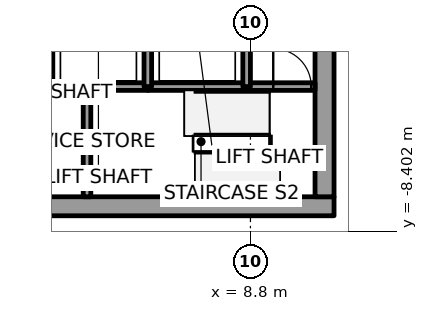
"""IFC4 building model, lengths in metres.
Left out: names, types, materials, properties, quantities, classifications, styles, units other than length and angle.
Written with IfcOpenShell. Run it as: python <this file> out.ifc"""

import sys

from ifc_helpers import new_model, si_unit, direction, frame, frame_2d, origin, place, context, subcontext, project, spatial, rectangle, extrude, element, fill, save


model = new_model("IFC4")
c1 = context("Model", 3, precision=1e-05, world=origin(), true_north=direction((0.0, 1.0)))
c2 = subcontext(c1, "Body", "Model", "MODEL_VIEW")
j1 = project(units=[si_unit("LENGTHUNIT", "METRE"), si_unit("PLANEANGLEUNIT", "RADIAN")], contexts=[c1])
p1 = place(None, origin())
s1 = spatial("IfcSite", under=j1, at=p1, CompositionType="ELEMENT")
p2 = place(p1, origin())
s2 = spatial("IfcBuilding", under=s1, at=p2, CompositionType="ELEMENT")
p3 = place(p2, frame((0.0, 0.0, 107.2)))
s3 = spatial("IfcBuildingStorey", under=s2, at=p3, CompositionType="ELEMENT", Elevation=107.2)
p4 = place(p3, frame((-11.0, -7.75, 0.0), z_axis=(0.0, 0.0, 1.0), x_axis=(1.0, 0.0, 0.0)))
e1 = element("IfcWall", 1, at=p4, inside=s3, PredefinedType="SHEAR", context=c2, shape_type="SweptSolid", body=[
    extrude(rectangle(XDim=22.0, YDim=0.5, at=frame_2d((11.0, 0.0))), origin(), (0.0, 0.0, 1.0), 5.4),
])
p5 = place(p4, frame((10.45, 0.0, 0.0)))
e2 = element("IfcOpeningElement", 2, at=p5, cuts=e1, PredefinedType="OPENING", context=c2, shape_type="SweptSolid", body=[
    extrude(rectangle(XDim=1.1, YDim=2.1, at=frame_2d((0.55, 1.05))), frame((0.0, 0.25, 0.0), z_axis=(0.0, -1.0, 0.0), x_axis=(1.0, 0.0, 0.0)), (0.0, 0.0, 1.0), 0.5),
])
p6 = place(p3, frame((10.75, -7.5, 0.0), z_axis=(0.0, 0.0, 1.0), x_axis=(0.0, 1.0, 0.0)))
e3 = element("IfcWall", 3, at=p6, inside=s3, PredefinedType="SHEAR", context=c2, shape_type="SweptSolid", body=[
    extrude(rectangle(XDim=15.0, YDim=0.5, at=frame_2d((7.5, 0.0))), origin(), (0.0, 0.0, 1.0), 5.4),
])
p7 = place(p6, frame((6.6, 0.0, 0.0)))
e4 = element("IfcOpeningElement", 4, at=p7, cuts=e3, PredefinedType="OPENING", context=c2, shape_type="SweptSolid", body=[
    extrude(rectangle(XDim=1.8, YDim=2.1, at=frame_2d((0.9, 1.05))), frame((0.0, 0.25, 0.0), z_axis=(0.0, -1.0, 0.0), x_axis=(1.0, 0.0, 0.0)), (0.0, 0.0, 1.0), 0.5),
])
p8 = place(p3, frame((4.5, -4.6, 0.0), z_axis=(0.0, 0.0, 1.0), x_axis=(-1.0, 0.0, 0.0)))
e5 = element("IfcWall", 5, at=p8, inside=s3, PredefinedType="SOLIDWALL", context=c2, shape_type="SweptSolid", body=[
    extrude(rectangle(XDim=1.0, YDim=0.2, at=frame_2d((0.5, 0.0))), origin(), (0.0, 0.0, 1.0), 5.25),
])
p9 = place(p3, frame((4.5, -7.5, 0.0), z_axis=(0.0, 0.0, 1.0), x_axis=(0.0, 1.0, 0.0)))
e6 = element("IfcWall", 6, at=p9, inside=s3, PredefinedType="SOLIDWALL", context=c2, shape_type="SweptSolid", body=[
    extrude(rectangle(XDim=2.9, YDim=0.2, at=frame_2d((1.45, 0.0))), origin(), (0.0, 0.0, 1.0), 5.25),
])
p10 = place(p3, frame((4.5, -4.6, 0.0), z_axis=(0.0, 0.0, 1.0), x_axis=(1.0, 0.0, 0.0)))
e7 = element("IfcWall", 7, at=p10, inside=s3, PredefinedType="SOLIDWALL", context=c2, shape_type="SweptSolid", body=[
    extrude(rectangle(XDim=1.6, YDim=0.2, at=frame_2d((0.8, 0.0))), origin(), (0.0, 0.0, 1.0), 5.25),
])
p11 = place(p3, frame((6.1, -4.6, 0.0), z_axis=(0.0, 0.0, 1.0), x_axis=(1.0, 0.0, 0.0)))
e8 = element("IfcWall", 8, at=p11, inside=s3, PredefinedType="SOLIDWALL", context=c2, shape_type="SweptSolid", body=[
    extrude(rectangle(XDim=2.6, YDim=0.2, at=frame_2d((1.3, 0.0))), origin(), (0.0, 0.0, 1.0), 5.25),
])
p12 = place(p3, frame((6.1, -4.6, 0.0), z_axis=(0.0, 0.0, 1.0), x_axis=(0.0, 1.0, 0.0)))
e9 = element("IfcWall", 9, at=p12, inside=s3, PredefinedType="SOLIDWALL", context=c2, shape_type="SweptSolid", body=[
    extrude(rectangle(XDim=2.8, YDim=0.2, at=frame_2d((1.4, 0.0))), origin(), (0.0, 0.0, 1.0), 5.25),
])
p13 = place(p3, frame((8.7, -4.6, 0.0), z_axis=(0.0, 0.0, 1.0), x_axis=(1.0, 0.0, 0.0)))
e10 = element("IfcWall", 10, at=p13, inside=s3, PredefinedType="SOLIDWALL", context=c2, shape_type="SweptSolid", body=[
    extrude(rectangle(XDim=1.8, YDim=0.2, at=frame_2d((0.9, 0.0))), origin(), (0.0, 0.0, 1.0), 5.25),
])
p14 = place(p13, frame((0.7, 0.0, 0.0)))
e11 = element("IfcOpeningElement", 11, at=p14, cuts=e10, PredefinedType="OPENING", context=c2, shape_type="SweptSolid", body=[
    extrude(rectangle(XDim=1.0, YDim=2.1, at=frame_2d((0.5, 1.05))), frame((0.0, 0.1, 0.0), z_axis=(0.0, -1.0, 0.0), x_axis=(1.0, 0.0, 0.0)), (0.0, 0.0, 1.0), 0.2),
])
p15 = place(p3, frame((8.7, -1.8, 0.0), z_axis=(0.0, 0.0, 1.0), x_axis=(0.0, -1.0, 0.0)))
e12 = element("IfcWall", 12, at=p15, inside=s3, PredefinedType="SOLIDWALL", context=c2, shape_type="SweptSolid", body=[
    extrude(rectangle(XDim=2.8, YDim=0.2, at=frame_2d((1.4, 0.0))), origin(), (0.0, 0.0, 1.0), 5.25),
])
p16 = place(p14, origin())
e13 = element("IfcDoor", 13, at=p16, inside=s3, OperationType="SINGLE_SWING_RIGHT", PredefinedType="DOOR", context=c2, shape_type="SweptSolid", body=[
    extrude(rectangle(XDim=1.0, YDim=2.1, at=frame_2d((0.5, 1.05))), frame((0.0, 0.025, 0.0), z_axis=(0.0, -1.0, 0.0), x_axis=(1.0, 0.0, 0.0)), (0.0, 0.0, 1.0), 0.05),
])
fill(e11, e13)
save(model, sys.argv[1])
